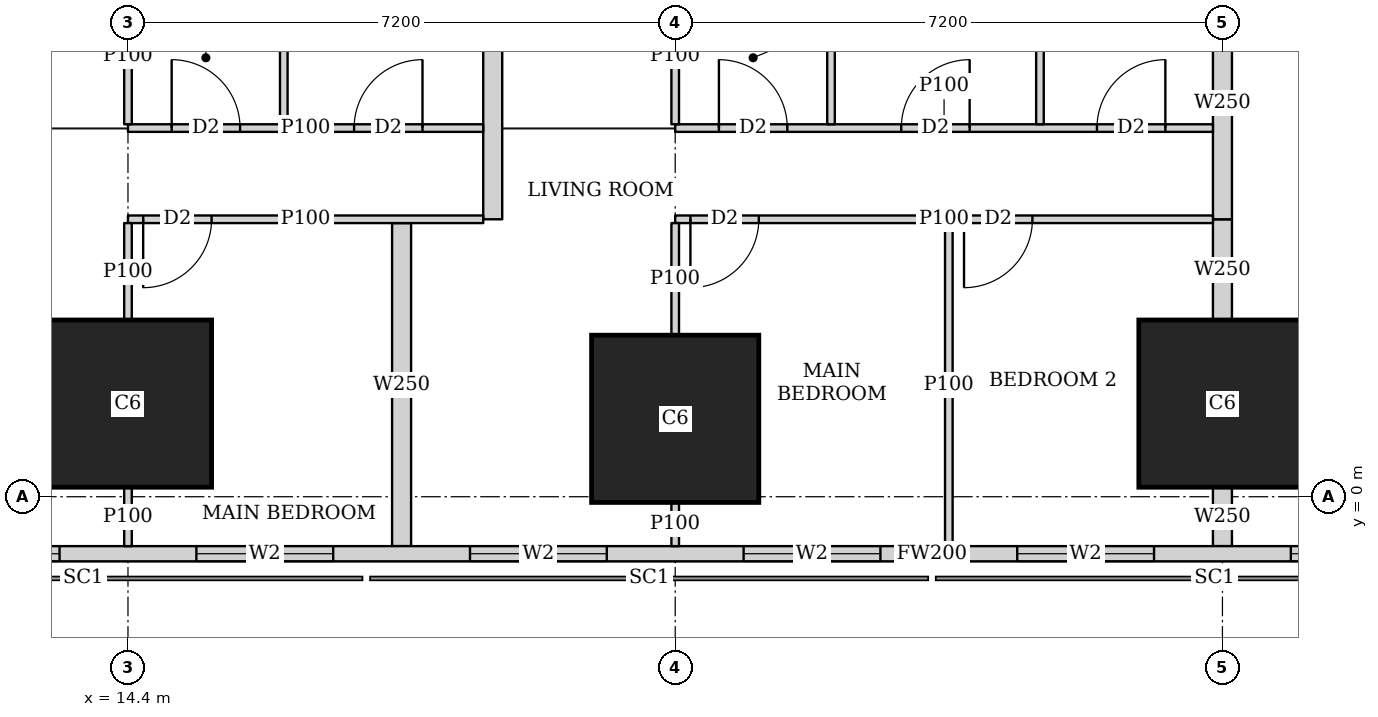
"""IFC4 building model, lengths in metres.
Left out: names, types, materials, properties, quantities, classifications, styles, units other than length and angle.
Written with IfcOpenShell. Run it as: python <this file> out.ifc"""

import sys

from ifc_helpers import new_model, si_unit, direction, frame, frame_2d, origin, origin_2d, place, context, subcontext, project, spatial, rectangle, extrude, element, fill, save


model = new_model("IFC4")
c1 = context("Model", 3, precision=1e-05, world=origin(), true_north=direction((0.0, 1.0)))
c2 = subcontext(c1, "Body", "Model", "MODEL_VIEW")
j1 = project(units=[si_unit("LENGTHUNIT", "METRE"), si_unit("PLANEANGLEUNIT", "RADIAN")], contexts=[c1])
p1 = place(None, origin())
s1 = spatial("IfcSite", under=j1, at=p1, CompositionType="ELEMENT")
p2 = place(p1, origin())
s2 = spatial("IfcBuilding", under=s1, at=p2, CompositionType="ELEMENT")
p3 = place(p2, frame((0.0, 0.0, 111.65)))
s3 = spatial("IfcBuildingStorey", under=s2, at=p3, CompositionType="ELEMENT", Elevation=111.65)
for number, where, z_axis, x_axis in (
    (1, (14.4, 1.225, 0.0), (0.0, 0.0, 1.0), (1.0, 0.0, 0.0)),
    (2, (21.6, 1.025, 0.0), (0.0, 0.0, 1.0), (1.0, 0.0, 0.0)),
    (3, (28.8, 1.225, 0.0), (0.0, 0.0, 1.0), (1.0, 0.0, 0.0)),
):
    element("IfcColumn", number, at=place(p3, frame(where, z_axis=z_axis, x_axis=x_axis)), inside=s3, PredefinedType="COLUMN", context=c2, shape_type="SweptSolid", body=[
        extrude(rectangle(XDim=2.2, YDim=2.2, at=origin_2d()), origin(), (0.0, 0.0, 1.0), 3.75),
    ])
p4 = place(p3, frame((2.163, -0.75, 0.0), z_axis=(0.0, 0.0, 1.0), x_axis=(1.0, 0.0, 0.0)))
e4 = element("IfcWall", 4, at=p4, inside=s3, PredefinedType="SOLIDWALL", context=c2, shape_type="SweptSolid", body=[
    extrude(rectangle(XDim=45.628, YDim=0.2, at=frame_2d((22.814, 0.0))), origin(), (0.0, 0.0, 1.0), 3.5),
])
p5 = place(p4, frame((9.537, 0.0, 0.9)))
e5 = element("IfcOpeningElement", 5, at=p5, cuts=e4, PredefinedType="OPENING", context=c2, shape_type="SweptSolid", body=[
    extrude(rectangle(XDim=1.8, YDim=1.5, at=frame_2d((0.9, 0.75))), frame((0.0, 0.11, 0.0), z_axis=(0.0, -1.0, 0.0), x_axis=(1.0, 0.0, 0.0)), (0.0, 0.0, 1.0), 0.22),
])
p6 = place(p4, frame((13.137, 0.0, 0.9)))
e6 = element("IfcOpeningElement", 6, at=p6, cuts=e4, PredefinedType="OPENING", context=c2, shape_type="SweptSolid", body=[
    extrude(rectangle(XDim=1.8, YDim=1.5, at=frame_2d((0.9, 0.75))), frame((0.0, 0.11, 0.0), z_axis=(0.0, -1.0, 0.0), x_axis=(1.0, 0.0, 0.0)), (0.0, 0.0, 1.0), 0.22),
])
p7 = place(p4, frame((16.737, 0.0, 0.9)))
e7 = element("IfcOpeningElement", 7, at=p7, cuts=e4, PredefinedType="OPENING", context=c2, shape_type="SweptSolid", body=[
    extrude(rectangle(XDim=1.8, YDim=1.5, at=frame_2d((0.9, 0.75))), frame((0.0, 0.11, 0.0), z_axis=(0.0, -1.0, 0.0), x_axis=(1.0, 0.0, 0.0)), (0.0, 0.0, 1.0), 0.22),
])
p8 = place(p4, frame((20.337, 0.0, 0.9)))
e8 = element("IfcOpeningElement", 8, at=p8, cuts=e4, PredefinedType="OPENING", context=c2, shape_type="SweptSolid", body=[
    extrude(rectangle(XDim=1.8, YDim=1.5, at=frame_2d((0.9, 0.75))), frame((0.0, 0.11, 0.0), z_axis=(0.0, -1.0, 0.0), x_axis=(1.0, 0.0, 0.0)), (0.0, 0.0, 1.0), 0.22),
])
p9 = place(p4, frame((23.937, 0.0, 0.9)))
e9 = element("IfcOpeningElement", 9, at=p9, cuts=e4, PredefinedType="OPENING", context=c2, shape_type="SweptSolid", body=[
    extrude(rectangle(XDim=1.8, YDim=1.5, at=frame_2d((0.9, 0.75))), frame((0.0, 0.11, 0.0), z_axis=(0.0, -1.0, 0.0), x_axis=(1.0, 0.0, 0.0)), (0.0, 0.0, 1.0), 0.22),
])
p10 = place(p4, frame((27.537, 0.0, 0.9)))
e10 = element("IfcOpeningElement", 10, at=p10, cuts=e4, PredefinedType="OPENING", context=c2, shape_type="SweptSolid", body=[
    extrude(rectangle(XDim=1.8, YDim=1.5, at=frame_2d((0.9, 0.75))), frame((0.0, 0.11, 0.0), z_axis=(0.0, -1.0, 0.0), x_axis=(1.0, 0.0, 0.0)), (0.0, 0.0, 1.0), 0.22),
])
p11 = place(p4, frame((31.137, 0.0, 0.9)))
e11 = element("IfcOpeningElement", 11, at=p11, cuts=e4, PredefinedType="OPENING", context=c2, shape_type="SweptSolid", body=[
    extrude(rectangle(XDim=1.8, YDim=1.5, at=frame_2d((0.9, 0.75))), frame((0.0, 0.11, 0.0), z_axis=(0.0, -1.0, 0.0), x_axis=(1.0, 0.0, 0.0)), (0.0, 0.0, 1.0), 0.22),
])
p12 = place(p4, frame((34.737, 0.0, 0.9)))
e12 = element("IfcOpeningElement", 12, at=p12, cuts=e4, PredefinedType="OPENING", context=c2, shape_type="SweptSolid", body=[
    extrude(rectangle(XDim=1.8, YDim=1.5, at=frame_2d((0.9, 0.75))), frame((0.0, 0.11, 0.0), z_axis=(0.0, -1.0, 0.0), x_axis=(1.0, 0.0, 0.0)), (0.0, 0.0, 1.0), 0.22),
])
p13 = place(p3, frame((19.074, 3.65, 0.0), z_axis=(0.0, 0.0, 1.0), x_axis=(-1.0, 0.0, 0.0)))
e13 = element("IfcWall", 13, at=p13, inside=s3, PredefinedType="PARTITIONING", context=c2, shape_type="SweptSolid", body=[
    extrude(rectangle(XDim=4.674, YDim=0.1, at=frame_2d((2.337, 0.0))), origin(), (0.0, 0.0, 1.0), 3.5),
])
p14 = place(p13, frame((3.574, 0.0, 0.0)))
e14 = element("IfcOpeningElement", 14, at=p14, cuts=e13, PredefinedType="OPENING", context=c2, shape_type="SweptSolid", body=[
    extrude(rectangle(XDim=0.9, YDim=2.1, at=frame_2d((0.45, 1.05))), frame((0.0, 0.06, 0.0), z_axis=(0.0, -1.0, 0.0), x_axis=(1.0, 0.0, 0.0)), (0.0, 0.0, 1.0), 0.12),
])
p15 = place(p3, frame((19.074, 4.85, 0.0), z_axis=(0.0, 0.0, 1.0), x_axis=(-1.0, 0.0, 0.0)))
e15 = element("IfcWall", 15, at=p15, inside=s3, PredefinedType="PARTITIONING", context=c2, shape_type="SweptSolid", body=[
    extrude(rectangle(XDim=4.674, YDim=0.1, at=frame_2d((2.337, 0.0))), origin(), (0.0, 0.0, 1.0), 3.5),
])
p16 = place(p15, frame((3.199, 0.0, 0.0)))
e16 = element("IfcOpeningElement", 16, at=p16, cuts=e15, PredefinedType="OPENING", context=c2, shape_type="SweptSolid", body=[
    extrude(rectangle(XDim=0.9, YDim=2.1, at=frame_2d((0.45, 1.05))), frame((0.0, 0.06, 0.0), z_axis=(0.0, -1.0, 0.0), x_axis=(1.0, 0.0, 0.0)), (0.0, 0.0, 1.0), 0.12),
])
p17 = place(p15, frame((0.799, 0.0, 0.0)))
e17 = element("IfcOpeningElement", 17, at=p17, cuts=e15, PredefinedType="OPENING", context=c2, shape_type="SweptSolid", body=[
    extrude(rectangle(XDim=0.9, YDim=2.1, at=frame_2d((0.45, 1.05))), frame((0.0, 0.06, 0.0), z_axis=(0.0, -1.0, 0.0), x_axis=(1.0, 0.0, 0.0)), (0.0, 0.0, 1.0), 0.12),
])
p18 = place(p3, frame((14.4, -0.65, 0.0), z_axis=(0.0, 0.0, 1.0), x_axis=(0.0, 1.0, 0.0)))
e18 = element("IfcWall", 18, at=p18, inside=s3, PredefinedType="PARTITIONING", context=c2, shape_type="SweptSolid", body=[
    extrude(rectangle(XDim=0.774, YDim=0.1, at=frame_2d((0.387, 0.0))), origin(), (0.0, 0.0, 1.0), 3.5),
])
p19 = place(p3, frame((14.4, 2.326, 0.0), z_axis=(0.0, 0.0, 1.0), x_axis=(0.0, 1.0, 0.0)))
e19 = element("IfcWall", 19, at=p19, inside=s3, PredefinedType="PARTITIONING", context=c2, shape_type="SweptSolid", body=[
    extrude(rectangle(XDim=1.274, YDim=0.1, at=frame_2d((0.637, 0.0))), origin(), (0.0, 0.0, 1.0), 3.5),
])
p20 = place(p3, frame((14.4, 4.9, 0.0), z_axis=(0.0, 0.0, 1.0), x_axis=(0.0, 1.0, 0.0)))
e20 = element("IfcWall", 20, at=p20, inside=s3, PredefinedType="PARTITIONING", context=c2, shape_type="SweptSolid", body=[
    extrude(rectangle(XDim=1.799, YDim=0.1, at=frame_2d((0.899, 0.0))), origin(), (0.0, 0.0, 1.0), 3.5),
])
p21 = place(p3, frame((16.45, 4.9, 0.0), z_axis=(0.0, 0.0, 1.0), x_axis=(0.0, 1.0, 0.0)))
e21 = element("IfcWall", 21, at=p21, inside=s3, PredefinedType="PARTITIONING", context=c2, shape_type="SweptSolid", body=[
    extrude(rectangle(XDim=3.525, YDim=0.1, at=frame_2d((1.763, 0.0))), origin(), (0.0, 0.0, 1.0), 3.5),
])
p22 = place(p3, frame((28.675, 3.65, 0.0), z_axis=(0.0, 0.0, 1.0), x_axis=(-1.0, 0.0, 0.0)))
e22 = element("IfcWall", 22, at=p22, inside=s3, PredefinedType="PARTITIONING", context=c2, shape_type="SweptSolid", body=[
    extrude(rectangle(XDim=7.075, YDim=0.1, at=frame_2d((3.538, 0.0))), origin(), (0.0, 0.0, 1.0), 3.5),
])
p23 = place(p22, frame((5.975, 0.0, 0.0)))
e23 = element("IfcOpeningElement", 23, at=p23, cuts=e22, PredefinedType="OPENING", context=c2, shape_type="SweptSolid", body=[
    extrude(rectangle(XDim=0.9, YDim=2.1, at=frame_2d((0.45, 1.05))), frame((0.0, 0.06, 0.0), z_axis=(0.0, -1.0, 0.0), x_axis=(1.0, 0.0, 0.0)), (0.0, 0.0, 1.0), 0.12),
])
p24 = place(p22, frame((2.375, 0.0, 0.0)))
e24 = element("IfcOpeningElement", 24, at=p24, cuts=e22, PredefinedType="OPENING", context=c2, shape_type="SweptSolid", body=[
    extrude(rectangle(XDim=0.9, YDim=2.1, at=frame_2d((0.45, 1.05))), frame((0.0, 0.06, 0.0), z_axis=(0.0, -1.0, 0.0), x_axis=(1.0, 0.0, 0.0)), (0.0, 0.0, 1.0), 0.12),
])
p25 = place(p3, frame((28.675, 4.85, 0.0), z_axis=(0.0, 0.0, 1.0), x_axis=(-1.0, 0.0, 0.0)))
e25 = element("IfcWall", 25, at=p25, inside=s3, PredefinedType="PARTITIONING", context=c2, shape_type="SweptSolid", body=[
    extrude(rectangle(XDim=7.075, YDim=0.1, at=frame_2d((3.538, 0.0))), origin(), (0.0, 0.0, 1.0), 3.5),
])
p26 = place(p25, frame((5.6, 0.0, 0.0)))
e26 = element("IfcOpeningElement", 26, at=p26, cuts=e25, PredefinedType="OPENING", context=c2, shape_type="SweptSolid", body=[
    extrude(rectangle(XDim=0.9, YDim=2.1, at=frame_2d((0.45, 1.05))), frame((0.0, 0.06, 0.0), z_axis=(0.0, -1.0, 0.0), x_axis=(1.0, 0.0, 0.0)), (0.0, 0.0, 1.0), 0.12),
])
p27 = place(p25, frame((0.626, 0.0, 0.0)))
e27 = element("IfcOpeningElement", 27, at=p27, cuts=e25, PredefinedType="OPENING", context=c2, shape_type="SweptSolid", body=[
    extrude(rectangle(XDim=0.9, YDim=2.1, at=frame_2d((0.45, 1.05))), frame((0.0, 0.06, 0.0), z_axis=(0.0, -1.0, 0.0), x_axis=(1.0, 0.0, 0.0)), (0.0, 0.0, 1.0), 0.12),
])
p28 = place(p25, frame((3.201, 0.0, 0.0)))
e28 = element("IfcOpeningElement", 28, at=p28, cuts=e25, PredefinedType="OPENING", context=c2, shape_type="SweptSolid", body=[
    extrude(rectangle(XDim=0.9, YDim=2.1, at=frame_2d((0.45, 1.05))), frame((0.0, 0.06, 0.0), z_axis=(0.0, -1.0, 0.0), x_axis=(1.0, 0.0, 0.0)), (0.0, 0.0, 1.0), 0.12),
])
p29 = place(p3, frame((21.6, -0.65, 0.0), z_axis=(0.0, 0.0, 1.0), x_axis=(0.0, 1.0, 0.0)))
e29 = element("IfcWall", 29, at=p29, inside=s3, PredefinedType="PARTITIONING", context=c2, shape_type="SweptSolid", body=[
    extrude(rectangle(XDim=0.574, YDim=0.1, at=frame_2d((0.287, 0.0))), origin(), (0.0, 0.0, 1.0), 3.5),
])
p30 = place(p3, frame((21.6, 2.126, 0.0), z_axis=(0.0, 0.0, 1.0), x_axis=(0.0, 1.0, 0.0)))
e30 = element("IfcWall", 30, at=p30, inside=s3, PredefinedType="PARTITIONING", context=c2, shape_type="SweptSolid", body=[
    extrude(rectangle(XDim=1.474, YDim=0.1, at=frame_2d((0.737, 0.0))), origin(), (0.0, 0.0, 1.0), 3.5),
])
p31 = place(p3, frame((25.2, -0.65, 0.0), z_axis=(0.0, 0.0, 1.0), x_axis=(0.0, 1.0, 0.0)))
e31 = element("IfcWall", 31, at=p31, inside=s3, PredefinedType="PARTITIONING", context=c2, shape_type="SweptSolid", body=[
    extrude(rectangle(XDim=4.25, YDim=0.1, at=frame_2d((2.125, 0.0))), origin(), (0.0, 0.0, 1.0), 2.2),
])
p32 = place(p3, frame((21.6, 4.9, 0.0), z_axis=(0.0, 0.0, 1.0), x_axis=(0.0, 1.0, 0.0)))
e32 = element("IfcWall", 32, at=p32, inside=s3, PredefinedType="PARTITIONING", context=c2, shape_type="SweptSolid", body=[
    extrude(rectangle(XDim=1.799, YDim=0.1, at=frame_2d((0.899, 0.0))), origin(), (0.0, 0.0, 1.0), 3.5),
])
for number, where, z_axis, x_axis in (
    (33, (26.399, 4.9, 0.0), (0.0, 0.0, 1.0), (0.0, 1.0, 0.0)),
    (34, (23.65, 4.9, 0.0), (0.0, 0.0, 1.0), (0.0, 1.0, 0.0)),
):
    element("IfcWall", number, at=place(p3, frame(where, z_axis=z_axis, x_axis=x_axis)), inside=s3, PredefinedType="PARTITIONING", context=c2, shape_type="SweptSolid", body=[
        extrude(rectangle(XDim=3.525, YDim=0.1, at=frame_2d((1.763, 0.0))), origin(), (0.0, 0.0, 1.0), 3.5),
    ])
p33 = place(p3, frame((18.0, -0.65, 0.0), z_axis=(0.0, 0.0, 1.0), x_axis=(0.0, 1.0, 0.0)))
e35 = element("IfcWall", 35, at=p33, inside=s3, PredefinedType="SOLIDWALL", context=c2, shape_type="SweptSolid", body=[
    extrude(rectangle(XDim=4.25, YDim=0.25, at=frame_2d((2.125, 0.0))), origin(), (0.0, 0.0, 1.0), 2.2),
])
p34 = place(p3, frame((19.199, 3.65, 0.0), z_axis=(0.0, 0.0, 1.0), x_axis=(0.0, 1.0, 0.0)))
e36 = element("IfcWall", 36, at=p34, inside=s3, PredefinedType="SOLIDWALL", context=c2, shape_type="SweptSolid", body=[
    extrude(rectangle(XDim=4.775, YDim=0.25, at=frame_2d((2.388, 0.0))), origin(), (0.0, 0.0, 1.0), 3.5),
])
p35 = place(p3, frame((28.8, -0.65, 0.0), z_axis=(0.0, 0.0, 1.0), x_axis=(0.0, 1.0, 0.0)))
e37 = element("IfcWall", 37, at=p35, inside=s3, PredefinedType="SOLIDWALL", context=c2, shape_type="SweptSolid", body=[
    extrude(rectangle(XDim=0.774, YDim=0.25, at=frame_2d((0.387, 0.0))), origin(), (0.0, 0.0, 1.0), 3.5),
])
p36 = place(p3, frame((28.8, 2.326, 0.0), z_axis=(0.0, 0.0, 1.0), x_axis=(0.0, 1.0, 0.0)))
e38 = element("IfcWall", 38, at=p36, inside=s3, PredefinedType="SOLIDWALL", context=c2, shape_type="SweptSolid", body=[
    extrude(rectangle(XDim=1.324, YDim=0.25, at=frame_2d((0.662, 0.0))), origin(), (0.0, 0.0, 1.0), 3.5),
])
p37 = place(p3, frame((28.8, 3.65, 0.0), z_axis=(0.0, 0.0, 1.0), x_axis=(0.0, 1.0, 0.0)))
e39 = element("IfcWall", 39, at=p37, inside=s3, PredefinedType="SOLIDWALL", context=c2, shape_type="SweptSolid", body=[
    extrude(rectangle(XDim=3.049, YDim=0.25, at=frame_2d((1.524, 0.0))), origin(), (0.0, 0.0, 1.0), 3.5),
])
p38 = place(p5, origin())
e40 = element("IfcWindow", 40, at=p38, inside=s3, PartitioningType="SINGLE_PANEL", PredefinedType="WINDOW", context=c2, shape_type="SweptSolid", body=[
    extrude(rectangle(XDim=1.8, YDim=1.5, at=frame_2d((0.9, 0.75))), frame((0.0, 0.03, 0.0), z_axis=(0.0, -1.0, 0.0), x_axis=(1.0, 0.0, 0.0)), (0.0, 0.0, 1.0), 0.06),
])
fill(e5, e40)
p39 = place(p6, origin())
e41 = element("IfcWindow", 41, at=p39, inside=s3, PartitioningType="SINGLE_PANEL", PredefinedType="WINDOW", context=c2, shape_type="SweptSolid", body=[
    extrude(rectangle(XDim=1.8, YDim=1.5, at=frame_2d((0.9, 0.75))), frame((0.0, 0.03, 0.0), z_axis=(0.0, -1.0, 0.0), x_axis=(1.0, 0.0, 0.0)), (0.0, 0.0, 1.0), 0.06),
])
fill(e6, e41)
p40 = place(p7, origin())
e42 = element("IfcWindow", 42, at=p40, inside=s3, PartitioningType="SINGLE_PANEL", PredefinedType="WINDOW", context=c2, shape_type="SweptSolid", body=[
    extrude(rectangle(XDim=1.8, YDim=1.5, at=frame_2d((0.9, 0.75))), frame((0.0, 0.03, 0.0), z_axis=(0.0, -1.0, 0.0), x_axis=(1.0, 0.0, 0.0)), (0.0, 0.0, 1.0), 0.06),
])
fill(e7, e42)
p41 = place(p8, origin())
e43 = element("IfcWindow", 43, at=p41, inside=s3, PartitioningType="SINGLE_PANEL", PredefinedType="WINDOW", context=c2, shape_type="SweptSolid", body=[
    extrude(rectangle(XDim=1.8, YDim=1.5, at=frame_2d((0.9, 0.75))), frame((0.0, 0.03, 0.0), z_axis=(0.0, -1.0, 0.0), x_axis=(1.0, 0.0, 0.0)), (0.0, 0.0, 1.0), 0.06),
])
fill(e8, e43)
p42 = place(p9, origin())
e44 = element("IfcWindow", 44, at=p42, inside=s3, PartitioningType="SINGLE_PANEL", PredefinedType="WINDOW", context=c2, shape_type="SweptSolid", body=[
    extrude(rectangle(XDim=1.8, YDim=1.5, at=frame_2d((0.9, 0.75))), frame((0.0, 0.03, 0.0), z_axis=(0.0, -1.0, 0.0), x_axis=(1.0, 0.0, 0.0)), (0.0, 0.0, 1.0), 0.06),
])
fill(e9, e44)
p43 = place(p10, origin())
e45 = element("IfcWindow", 45, at=p43, inside=s3, PartitioningType="SINGLE_PANEL", PredefinedType="WINDOW", context=c2, shape_type="SweptSolid", body=[
    extrude(rectangle(XDim=1.8, YDim=1.5, at=frame_2d((0.9, 0.75))), frame((0.0, 0.03, 0.0), z_axis=(0.0, -1.0, 0.0), x_axis=(1.0, 0.0, 0.0)), (0.0, 0.0, 1.0), 0.06),
])
fill(e10, e45)
p44 = place(p14, origin())
e46 = element("IfcDoor", 46, at=p44, inside=s3, OperationType="SINGLE_SWING_RIGHT", PredefinedType="DOOR", context=c2, shape_type="SweptSolid", body=[
    extrude(rectangle(XDim=0.9, YDim=2.1, at=frame_2d((0.45, 1.05))), frame((0.0, 0.025, 0.0), z_axis=(0.0, -1.0, 0.0), x_axis=(1.0, 0.0, 0.0)), (0.0, 0.0, 1.0), 0.05),
])
fill(e14, e46)
p45 = place(p16, origin())
e47 = element("IfcDoor", 47, at=p45, inside=s3, OperationType="SINGLE_SWING_LEFT", PredefinedType="DOOR", context=c2, shape_type="SweptSolid", body=[
    extrude(rectangle(XDim=0.9, YDim=2.1, at=frame_2d((0.45, 1.05))), frame((0.0, 0.025, 0.0), z_axis=(0.0, -1.0, 0.0), x_axis=(1.0, 0.0, 0.0)), (0.0, 0.0, 1.0), 0.05),
])
fill(e16, e47)
p46 = place(p17, origin())
e48 = element("IfcDoor", 48, at=p46, inside=s3, OperationType="SINGLE_SWING_RIGHT", PredefinedType="DOOR", context=c2, shape_type="SweptSolid", body=[
    extrude(rectangle(XDim=0.9, YDim=2.1, at=frame_2d((0.45, 1.05))), frame((0.0, 0.025, 0.0), z_axis=(0.0, -1.0, 0.0), x_axis=(1.0, 0.0, 0.0)), (0.0, 0.0, 1.0), 0.05),
])
fill(e17, e48)
p47 = place(p23, origin())
e49 = element("IfcDoor", 49, at=p47, inside=s3, OperationType="SINGLE_SWING_RIGHT", PredefinedType="DOOR", context=c2, shape_type="SweptSolid", body=[
    extrude(rectangle(XDim=0.9, YDim=2.1, at=frame_2d((0.45, 1.05))), frame((0.0, 0.025, 0.0), z_axis=(0.0, -1.0, 0.0), x_axis=(1.0, 0.0, 0.0)), (0.0, 0.0, 1.0), 0.05),
])
fill(e23, e49)
p48 = place(p24, origin())
e50 = element("IfcDoor", 50, at=p48, inside=s3, OperationType="SINGLE_SWING_RIGHT", PredefinedType="DOOR", context=c2, shape_type="SweptSolid", body=[
    extrude(rectangle(XDim=0.9, YDim=2.1, at=frame_2d((0.45, 1.05))), frame((0.0, 0.025, 0.0), z_axis=(0.0, -1.0, 0.0), x_axis=(1.0, 0.0, 0.0)), (0.0, 0.0, 1.0), 0.05),
])
fill(e24, e50)
p49 = place(p26, origin())
e51 = element("IfcDoor", 51, at=p49, inside=s3, OperationType="SINGLE_SWING_LEFT", PredefinedType="DOOR", context=c2, shape_type="SweptSolid", body=[
    extrude(rectangle(XDim=0.9, YDim=2.1, at=frame_2d((0.45, 1.05))), frame((0.0, 0.025, 0.0), z_axis=(0.0, -1.0, 0.0), x_axis=(1.0, 0.0, 0.0)), (0.0, 0.0, 1.0), 0.05),
])
fill(e26, e51)
p50 = place(p27, origin())
e52 = element("IfcDoor", 52, at=p50, inside=s3, OperationType="SINGLE_SWING_RIGHT", PredefinedType="DOOR", context=c2, shape_type="SweptSolid", body=[
    extrude(rectangle(XDim=0.9, YDim=2.1, at=frame_2d((0.45, 1.05))), frame((0.0, 0.025, 0.0), z_axis=(0.0, -1.0, 0.0), x_axis=(1.0, 0.0, 0.0)), (0.0, 0.0, 1.0), 0.05),
])
fill(e27, e52)
p51 = place(p28, origin())
e53 = element("IfcDoor", 53, at=p51, inside=s3, OperationType="SINGLE_SWING_RIGHT", PredefinedType="DOOR", context=c2, shape_type="SweptSolid", body=[
    extrude(rectangle(XDim=0.9, YDim=2.1, at=frame_2d((0.45, 1.05))), frame((0.0, 0.025, 0.0), z_axis=(0.0, -1.0, 0.0), x_axis=(1.0, 0.0, 0.0)), (0.0, 0.0, 1.0), 0.05),
])
fill(e28, e53)
save(model, sys.argv[1])
